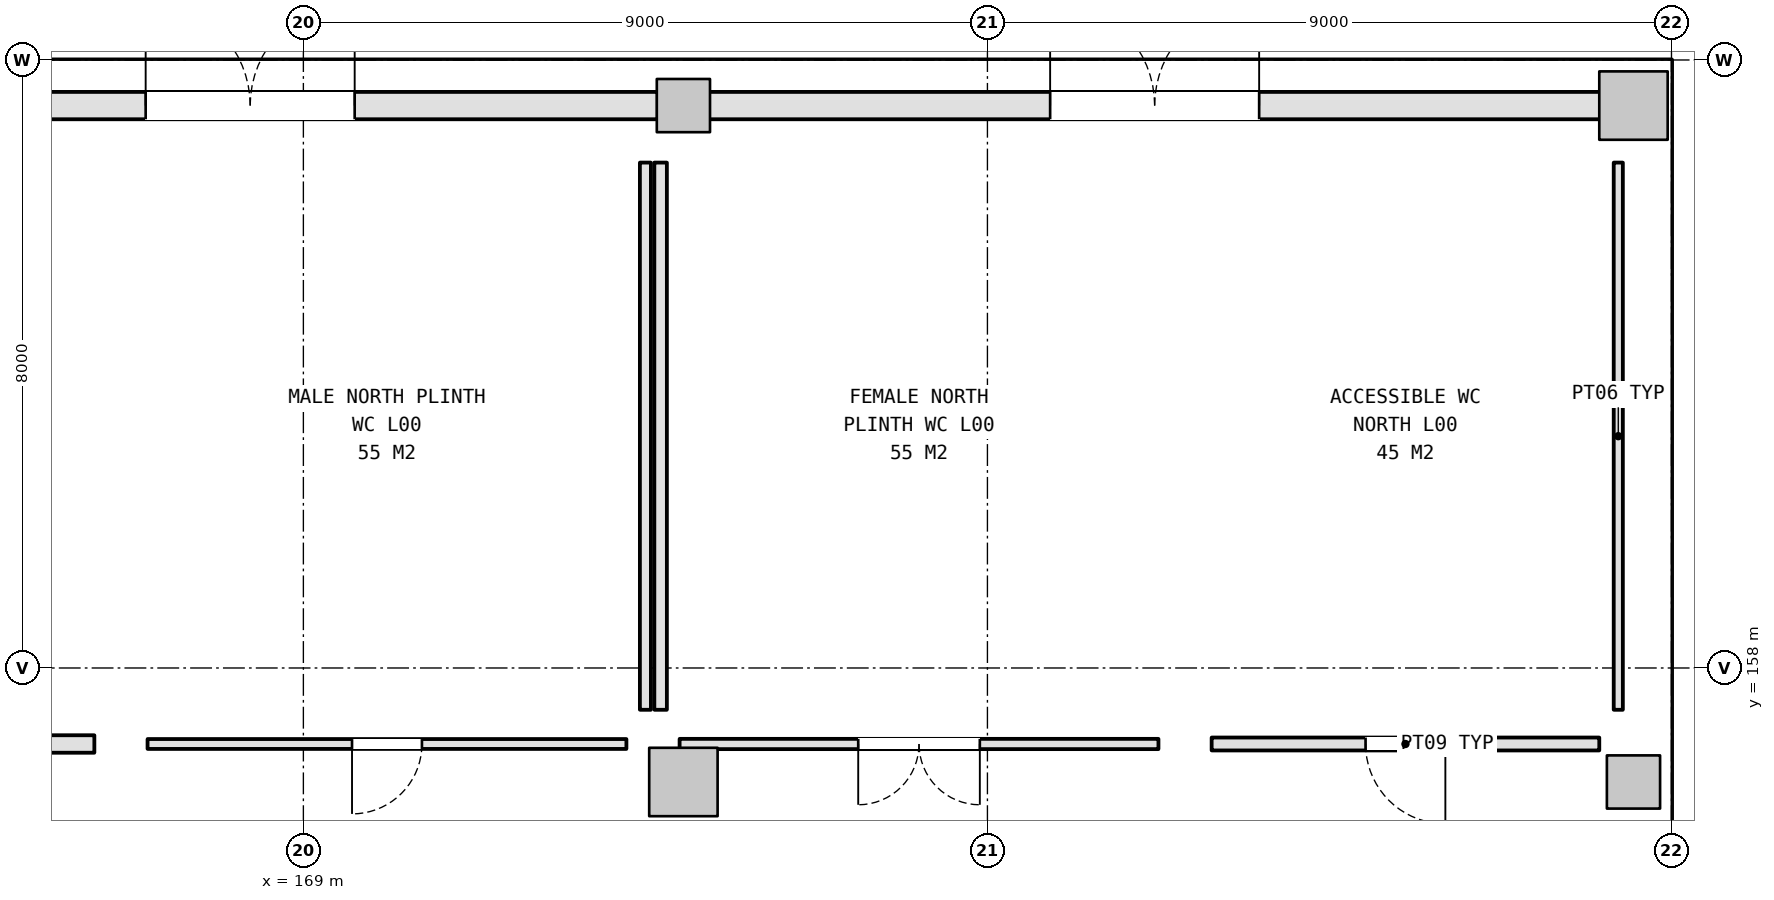
"""IFC4 building model, lengths in metres.
Left out: names, types, materials, properties, quantities, classifications, styles, units other than length and angle.
Written with IfcOpenShell. Run it as: python <this file> out.ifc"""

import sys

from ifc_helpers import new_model, si_unit, direction, frame, frame_2d, origin, origin_2d, place, context, subcontext, project, spatial, rectangle, extrude, element, fill, save


model = new_model("IFC4")
c1 = context("Model", 3, precision=1e-05, world=origin(), true_north=direction((0.0, 1.0)))
c2 = subcontext(c1, "Body", "Model", "MODEL_VIEW")
j1 = project(units=[si_unit("LENGTHUNIT", "METRE"), si_unit("PLANEANGLEUNIT", "RADIAN")], contexts=[c1])
p1 = place(None, origin())
s1 = spatial("IfcSite", under=j1, at=p1, CompositionType="ELEMENT")
p2 = place(p1, origin())
s2 = spatial("IfcBuilding", under=s1, at=p2, CompositionType="ELEMENT")
p3 = place(p2, origin())
s3 = spatial("IfcBuildingStorey", under=s2, at=p3, CompositionType="ELEMENT", Elevation=0.0)
p4 = place(p3, frame((174.0, 156.5, 0.0), z_axis=(0.0, 0.0, 1.0), x_axis=(1.0, 0.0, 0.0)))
e1 = element("IfcColumn", 1, at=p4, inside=s3, PredefinedType="COLUMN", context=c2, shape_type="SweptSolid", body=[
    extrude(rectangle(XDim=0.9, YDim=0.9, at=origin_2d()), origin(), (0.0, 0.0, 1.0), 5.4),
])
for number, where, z_axis, x_axis in (
    (2, (174.0, 165.4, 0.0), (0.0, 0.0, 1.0), (1.0, 0.0, 0.0)),
    (3, (186.5, 156.5, 0.0), (0.0, 0.0, 1.0), (1.0, 0.0, 0.0)),
):
    element("IfcColumn", number, at=place(p3, frame(where, z_axis=z_axis, x_axis=x_axis)), inside=s3, PredefinedType="COLUMN", context=c2, shape_type="SweptSolid", body=[
        extrude(rectangle(XDim=0.7, YDim=0.7, at=origin_2d()), origin(), (0.0, 0.0, 1.0), 5.4),
    ])
p5 = place(p3, frame((186.5, 165.4, 0.0), z_axis=(0.0, 0.0, 1.0), x_axis=(1.0, 0.0, 0.0)))
e4 = element("IfcColumn", 4, at=p5, inside=s3, PredefinedType="COLUMN", context=c2, shape_type="SweptSolid", body=[
    extrude(rectangle(XDim=0.9, YDim=0.9, at=origin_2d()), origin(), (0.0, 0.0, 1.0), 5.4),
])
p6 = place(p3, frame((162.938, 165.4, 0.0), z_axis=(0.0, 0.0, 1.0), x_axis=(1.0, 0.0, 0.0)))
e5 = element("IfcWall", 5, at=p6, inside=s3, PredefinedType="SOLIDWALL", context=c2, shape_type="SweptSolid", body=[
    extrude(rectangle(XDim=10.724, YDim=0.36, at=frame_2d((5.362, 0.0))), origin(), (0.0, 0.0, 1.0), 4.475),
])
p7 = place(p6, frame((3.987, 0.0, 0.0)))
e6 = element("IfcOpeningElement", 6, at=p7, cuts=e5, PredefinedType="OPENING", context=c2, shape_type="SweptSolid", body=[
    extrude(rectangle(XDim=2.75, YDim=2.4, at=frame_2d((1.375, 1.2))), frame((0.0, 0.19, 0.0), z_axis=(0.0, -1.0, 0.0), x_axis=(1.0, 0.0, 0.0)), (0.0, 0.0, 1.0), 0.38),
])
p8 = place(p3, frame((174.338, 165.4, 0.0), z_axis=(0.0, 0.0, 1.0), x_axis=(1.0, 0.0, 0.0)))
e7 = element("IfcWall", 7, at=p8, inside=s3, PredefinedType="SOLIDWALL", context=c2, shape_type="SweptSolid", body=[
    extrude(rectangle(XDim=11.724, YDim=0.36, at=frame_2d((5.862, 0.0))), origin(), (0.0, 0.0, 1.0), 4.475),
])
p9 = place(p8, frame((4.487, 0.0, 0.0)))
e8 = element("IfcOpeningElement", 8, at=p9, cuts=e7, PredefinedType="OPENING", context=c2, shape_type="SweptSolid", body=[
    extrude(rectangle(XDim=2.75, YDim=2.4, at=frame_2d((1.375, 1.2))), frame((0.0, 0.19, 0.0), z_axis=(0.0, -1.0, 0.0), x_axis=(1.0, 0.0, 0.0)), (0.0, 0.0, 1.0), 0.38),
])
p10 = place(p3, frame((166.25, 157.0, 0.0), z_axis=(0.0, 0.0, 1.0), x_axis=(-1.0, 0.0, 0.0)))
e9 = element("IfcWall", 9, at=p10, inside=s3, PredefinedType="PLUMBINGWALL", context=c2, shape_type="SweptSolid", body=[
    extrude(rectangle(XDim=18.76, YDim=0.23, at=frame_2d((9.38, 0.0))), origin(), (0.0, 0.0, 1.0), 4.525),
])
p11 = place(p10, frame((8.43, 0.0, 0.0)))
e10 = element("IfcOpeningElement", 10, at=p11, cuts=e9, PredefinedType="OPENING", context=c2, shape_type="SweptSolid", body=[
    extrude(rectangle(XDim=1.9, YDim=2.3, at=frame_2d((0.95, 1.15))), frame((0.0, 0.125, 0.0), z_axis=(0.0, -1.0, 0.0), x_axis=(1.0, 0.0, 0.0)), (0.0, 0.0, 1.0), 0.25),
])
p12 = place(p3, frame((173.25, 157.0, 0.0), z_axis=(0.0, 0.0, 1.0), x_axis=(-1.0, 0.0, 0.0)))
e11 = element("IfcWall", 11, at=p12, inside=s3, PredefinedType="PARTITIONING", context=c2, shape_type="SweptSolid", body=[
    extrude(rectangle(XDim=6.3, YDim=0.13, at=frame_2d((3.15, 0.0))), origin(), (0.0, 0.0, 1.0), 5.12),
])
p13 = place(p12, frame((2.69, 0.0, 0.0)))
e12 = element("IfcOpeningElement", 12, at=p13, cuts=e11, PredefinedType="OPENING", context=c2, shape_type="SweptSolid", body=[
    extrude(rectangle(XDim=0.92, YDim=2.1, at=frame_2d((0.46, 1.05))), frame((0.0, 0.075, 0.0), z_axis=(0.0, -1.0, 0.0), x_axis=(1.0, 0.0, 0.0)), (0.0, 0.0, 1.0), 0.15),
])
p14 = place(p3, frame((173.5, 164.65, 0.0), z_axis=(0.0, 0.0, 1.0), x_axis=(0.0, -1.0, 0.0)))
e13 = element("IfcWall", 13, at=p14, inside=s3, PredefinedType="PARTITIONING", context=c2, shape_type="SweptSolid", body=[
    extrude(rectangle(XDim=7.2, YDim=0.145, at=frame_2d((3.6, 0.0))), origin(), (0.0, 0.0, 1.0), 4.675),
])
p15 = place(p3, frame((180.25, 157.0, 0.0), z_axis=(0.0, 0.0, 1.0), x_axis=(-1.0, 0.0, 0.0)))
e14 = element("IfcWall", 14, at=p15, inside=s3, PredefinedType="PARTITIONING", context=c2, shape_type="SweptSolid", body=[
    extrude(rectangle(XDim=6.3, YDim=0.135, at=frame_2d((3.15, 0.0))), origin(), (0.0, 0.0, 1.0), 4.525),
])
p16 = place(p15, frame((2.35, 0.0, 0.0)))
e15 = element("IfcOpeningElement", 15, at=p16, cuts=e14, PredefinedType="OPENING", context=c2, shape_type="SweptSolid", body=[
    extrude(rectangle(XDim=1.6, YDim=2.2, at=frame_2d((0.8, 1.1))), frame((0.0, 0.077, 0.0), z_axis=(0.0, -1.0, 0.0), x_axis=(1.0, 0.0, 0.0)), (0.0, 0.0, 1.0), 0.155),
])
p17 = place(p3, frame((173.7, 157.45, 0.0), z_axis=(0.0, 0.0, 1.0), x_axis=(0.0, 1.0, 0.0)))
e16 = element("IfcWall", 16, at=p17, inside=s3, PredefinedType="PARTITIONING", context=c2, shape_type="SweptSolid", body=[
    extrude(rectangle(XDim=7.2, YDim=0.165, at=frame_2d((3.6, 0.0))), origin(), (0.0, 0.0, 1.0), 4.525),
])
p18 = place(p3, frame((186.05, 157.0, 0.0), z_axis=(0.0, 0.0, 1.0), x_axis=(-1.0, 0.0, 0.0)))
e17 = element("IfcWall", 17, at=p18, inside=s3, PredefinedType="PARTITIONING", context=c2, shape_type="SweptSolid", body=[
    extrude(rectangle(XDim=5.1, YDim=0.17, at=frame_2d((2.55, 0.0))), origin(), (0.0, 0.0, 1.0), 5.12),
])
p19 = place(p18, frame((2.025, 0.0, 0.0)))
e18 = element("IfcOpeningElement", 18, at=p19, cuts=e17, PredefinedType="OPENING", context=c2, shape_type="SweptSolid", body=[
    extrude(rectangle(XDim=1.05, YDim=2.2, at=frame_2d((0.525, 1.1))), frame((0.0, 0.095, 0.0), z_axis=(0.0, -1.0, 0.0), x_axis=(1.0, 0.0, 0.0)), (0.0, 0.0, 1.0), 0.19),
])
p20 = place(p3, frame((186.3, 164.65, 0.0), z_axis=(0.0, 0.0, 1.0), x_axis=(0.0, -1.0, 0.0)))
e19 = element("IfcWall", 19, at=p20, inside=s3, PredefinedType="PARTITIONING", context=c2, shape_type="SweptSolid", body=[
    extrude(rectangle(XDim=7.2, YDim=0.12, at=frame_2d((3.6, 0.0))), origin(), (0.0, 0.0, 1.0), 4.475),
])
p21 = place(p7, origin())
e20 = element("IfcDoor", 20, at=p21, inside=s3, OperationType="DOUBLE_DOOR_SINGLE_SWING", PredefinedType="DOOR", context=c2, shape_type="SweptSolid", body=[
    extrude(rectangle(XDim=2.75, YDim=2.4, at=frame_2d((1.375, 1.2))), frame((0.0, 0.025, 0.0), z_axis=(0.0, -1.0, 0.0), x_axis=(1.0, 0.0, 0.0)), (0.0, 0.0, 1.0), 0.05),
])
fill(e6, e20)
p22 = place(p9, origin())
e21 = element("IfcDoor", 21, at=p22, inside=s3, OperationType="DOUBLE_DOOR_SINGLE_SWING", PredefinedType="DOOR", context=c2, shape_type="SweptSolid", body=[
    extrude(rectangle(XDim=2.75, YDim=2.4, at=frame_2d((1.375, 1.2))), frame((0.0, 0.025, 0.0), z_axis=(0.0, -1.0, 0.0), x_axis=(1.0, 0.0, 0.0)), (0.0, 0.0, 1.0), 0.05),
])
fill(e8, e21)
p23 = place(p13, origin())
e22 = element("IfcDoor", 22, at=p23, inside=s3, OperationType="SINGLE_SWING_RIGHT", PredefinedType="DOOR", context=c2, shape_type="SweptSolid", body=[
    extrude(rectangle(XDim=0.92, YDim=2.1, at=frame_2d((0.46, 1.05))), frame((0.0, 0.025, 0.0), z_axis=(0.0, -1.0, 0.0), x_axis=(1.0, 0.0, 0.0)), (0.0, 0.0, 1.0), 0.05),
])
fill(e12, e22)
p24 = place(p16, origin())
e23 = element("IfcDoor", 23, at=p24, inside=s3, OperationType="DOUBLE_DOOR_SINGLE_SWING", PredefinedType="DOOR", context=c2, shape_type="SweptSolid", body=[
    extrude(rectangle(XDim=1.6, YDim=2.2, at=frame_2d((0.8, 1.1))), frame((0.0, 0.025, 0.0), z_axis=(0.0, -1.0, 0.0), x_axis=(1.0, 0.0, 0.0)), (0.0, 0.0, 1.0), 0.05),
])
fill(e15, e23)
p25 = place(p19, origin())
e24 = element("IfcDoor", 24, at=p25, inside=s3, OperationType="SINGLE_SWING_LEFT", PredefinedType="DOOR", context=c2, shape_type="SweptSolid", body=[
    extrude(rectangle(XDim=1.05, YDim=2.2, at=frame_2d((0.525, 1.1))), frame((0.0, 0.025, 0.0), z_axis=(0.0, -1.0, 0.0), x_axis=(1.0, 0.0, 0.0)), (0.0, 0.0, 1.0), 0.05),
])
fill(e18, e24)
save(model, sys.argv[1])
